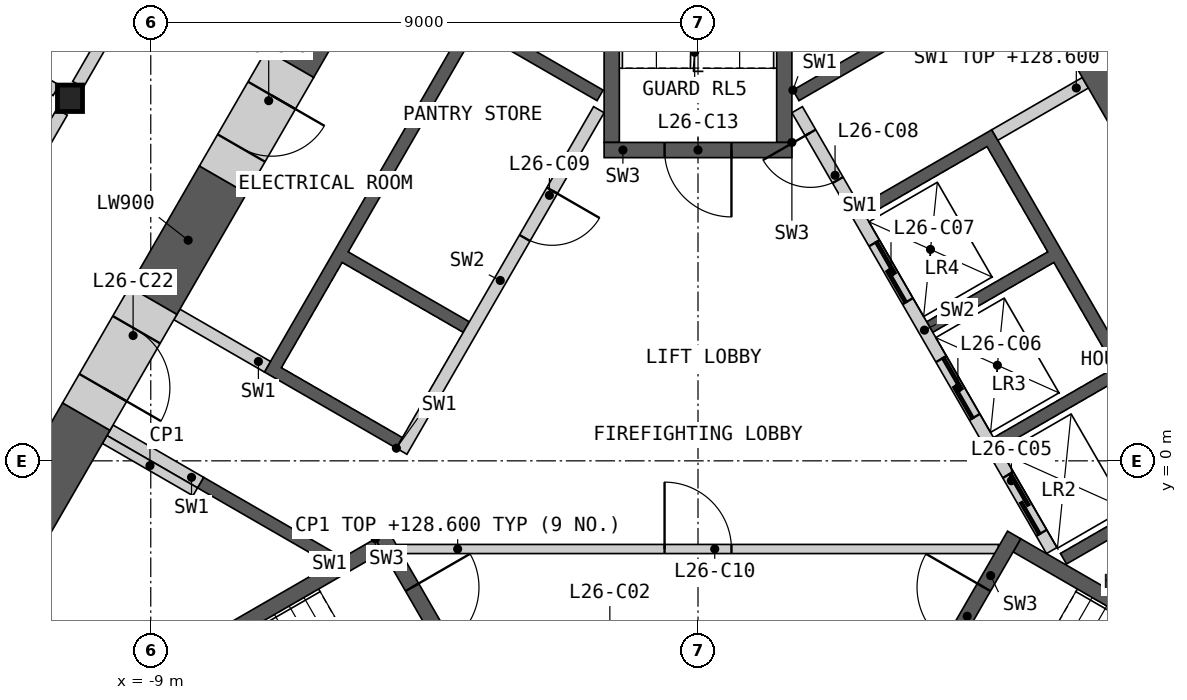
"""IFC4 building model, lengths in metres.
Left out: names, types, materials, properties, quantities, classifications, styles, units other than length and angle.
Written with IfcOpenShell. Run it as: python <this file> out.ifc"""

import sys

from ifc_helpers import new_model, si_unit, direction, frame, frame_2d, origin, origin_2d, place, context, subcontext, project, spatial, polyline, rectangle, i_section, outline, extrude, element, fill, save


model = new_model("IFC4")
c1 = context("Model", 3, precision=1e-05, world=origin(), true_north=direction((0.0, 1.0)))
c2 = subcontext(c1, "Body", "Model", "MODEL_VIEW")
j1 = project(units=[si_unit("LENGTHUNIT", "METRE"), si_unit("PLANEANGLEUNIT", "RADIAN")], contexts=[c1])
p1 = place(None, origin())
s1 = spatial("IfcSite", under=j1, at=p1, CompositionType="ELEMENT")
p2 = place(p1, origin())
s2 = spatial("IfcBuilding", under=s1, at=p2, CompositionType="ELEMENT")
p3 = place(p2, frame((0.0, 0.0, 124.8)))
s3 = spatial("IfcBuildingStorey", under=s2, at=p3, CompositionType="ELEMENT", Elevation=124.8)
p4 = place(p3, frame((-10.328, 5.963, 0.0), z_axis=(0.0, 0.0, 1.0), x_axis=(1.0, 0.0, 0.0)))
e1 = element("IfcColumn", 1, at=p4, inside=s3, PredefinedType="COLUMN", context=c2, shape_type="SweptSolid", body=[
    extrude(i_section(OverallWidth=0.412, OverallDepth=0.435, WebThickness=0.036, FlangeThickness=0.057, at=origin_2d()), origin(), (0.0, 0.0, 1.0), 4.2),
])
p5 = place(p3, origin())
e2 = element("IfcWall", 2, at=p5, inside=s3, PredefinedType="SHEAR", context=c2, shape_type="SweptSolid", body=[
    extrude(outline(polyline([(1.561, 6.097), (3.731, 7.35), (3.831, 7.177), (1.66, 5.924), (1.561, 6.097)])), origin(), (0.0, 0.0, 1.0), 3.8),
])
p6 = place(p3, origin())
e3 = element("IfcWall", 3, at=p6, inside=s3, PredefinedType="SHEAR", context=c2, shape_type="SweptSolid", body=[
    extrude(outline(polyline([(2.66, 4.192), (4.831, 5.445), (8.231, -0.444), (6.061, -1.697), (5.96, -1.524), (7.952, -0.374), (6.952, 1.358), (4.96, 0.208), (4.861, 0.381), (6.852, 1.531), (5.852, 3.263), (3.861, 2.113), (3.76, 2.287), (5.752, 3.437), (4.752, 5.169), (2.76, 4.019), (2.66, 4.192)])), origin(), (0.0, 0.0, 1.0), 3.8),
])
p7 = place(p3, frame((5.817, -1.476, 0.0), z_axis=(0.0, 0.0, 1.0), x_axis=(-0.500002616675, 0.866023893041, 0.0)))
e4 = element("IfcWall", 4, at=p7, inside=s3, PredefinedType="SOLIDWALL", context=c2, shape_type="SweptSolid", body=[
    extrude(rectangle(XDim=8.373, YDim=0.2, at=frame_2d((4.187, 0.0))), origin(), (0.0, 0.0, 1.0), 3.8),
])
p8 = place(p7, frame((0.337, 0.0, 0.0)))
e5 = element("IfcOpeningElement", 5, at=p8, cuts=e4, PredefinedType="OPENING", context=c2, shape_type="SweptSolid", body=[
    extrude(rectangle(XDim=1.1, YDim=2.1, at=frame_2d((0.55, 1.05))), frame((0.0, 0.11, 0.0), z_axis=(0.0, -1.0, 0.0), x_axis=(1.0, 0.0, 0.0)), (0.0, 0.0, 1.0), 0.22),
])
p9 = place(p7, frame((2.537, 0.0, 0.0)))
e6 = element("IfcOpeningElement", 6, at=p9, cuts=e4, PredefinedType="OPENING", context=c2, shape_type="SweptSolid", body=[
    extrude(rectangle(XDim=1.1, YDim=2.1, at=frame_2d((0.55, 1.05))), frame((0.0, 0.11, 0.0), z_axis=(0.0, -1.0, 0.0), x_axis=(1.0, 0.0, 0.0)), (0.0, 0.0, 1.0), 0.22),
])
p10 = place(p7, frame((4.737, 0.0, 0.0)))
e7 = element("IfcOpeningElement", 7, at=p10, cuts=e4, PredefinedType="OPENING", context=c2, shape_type="SweptSolid", body=[
    extrude(rectangle(XDim=1.1, YDim=2.1, at=frame_2d((0.55, 1.05))), frame((0.0, 0.11, 0.0), z_axis=(0.0, -1.0, 0.0), x_axis=(1.0, 0.0, 0.0)), (0.0, 0.0, 1.0), 0.22),
])
p11 = place(p7, frame((7.037, 0.0, 0.0)))
e8 = element("IfcOpeningElement", 8, at=p11, cuts=e4, PredefinedType="OPENING", context=c2, shape_type="SweptSolid", body=[
    extrude(rectangle(XDim=0.9, YDim=2.1, at=frame_2d((0.45, 1.05))), frame((0.0, 0.11, 0.0), z_axis=(0.0, -1.0, 0.0), x_axis=(1.0, 0.0, 0.0)), (0.0, 0.0, 1.0), 0.22),
])
p12 = place(p3, frame((4.881, 5.358, 0.0), z_axis=(0.0, 0.0, 1.0), x_axis=(0.866024871741, 0.500000921525, 0.0)))
e9 = element("IfcWall", 9, at=p12, inside=s3, PredefinedType="SHEAR", context=c2, shape_type="SweptSolid", body=[
    extrude(rectangle(XDim=1.72, YDim=0.2, at=frame_2d((0.86, 0.0))), origin(), (0.0, 0.0, 1.0), 3.8),
])
p13 = place(p3, origin())
e10 = element("IfcWall", 10, at=p13, inside=s3, PredefinedType="SHEAR", context=c2, shape_type="SweptSolid", body=[
    extrude(outline(polyline([(-6.061, -1.697), (-8.231, -0.444), (-8.131, -0.271), (-5.96, -1.524), (-6.061, -1.697)])), origin(), (0.0, 0.0, 1.0), 3.8),
])
p14 = place(p3, origin())
e11 = element("IfcWall", 11, at=p14, inside=s3, PredefinedType="SHEAR", context=c2, shape_type="SweptSolid", body=[
    extrude(outline(polyline([(-4.96, 0.208), (-7.131, 1.461), (-3.731, 7.35), (-1.561, 6.097), (-1.66, 5.924), (-3.652, 7.074), (-5.752, 3.437), (-3.76, 2.287), (-3.861, 2.113), (-5.852, 3.263), (-6.852, 1.531), (-4.861, 0.381), (-4.96, 0.208)])), origin(), (0.0, 0.0, 1.0), 3.8),
])
p15 = place(p3, frame((-1.631, 5.776, 0.0), z_axis=(0.0, 0.0, 1.0), x_axis=(-0.499992876559, -0.866029516466, 0.0)))
e12 = element("IfcWall", 12, at=p15, inside=s3, PredefinedType="SOLIDWALL", context=c2, shape_type="SweptSolid", body=[
    extrude(rectangle(XDim=6.486, YDim=0.2, at=frame_2d((3.243, 0.0))), origin(), (0.0, 0.0, 1.0), 3.8),
])
p16 = place(p15, frame((1.537, 0.0, 0.0)))
e13 = element("IfcOpeningElement", 13, at=p16, cuts=e12, PredefinedType="OPENING", context=c2, shape_type="SweptSolid", body=[
    extrude(rectangle(XDim=0.9, YDim=2.1, at=frame_2d((0.45, 1.05))), frame((0.0, 0.11, 0.0), z_axis=(0.0, -1.0, 0.0), x_axis=(1.0, 0.0, 0.0)), (0.0, 0.0, 1.0), 0.22),
])
for number, where, z_axis, x_axis in (
    (14, (-7.081, 1.548, 0.0), (0.0, 0.0, 1.0), (-0.866, 0.5, 0.0)),
    (15, (-8.181, -0.357, 0.0), (0.0, 0.0, 1.0), (-0.866, 0.5, 0.0)),
):
    element("IfcWall", number, at=place(p3, frame(where, z_axis=z_axis, x_axis=x_axis)), inside=s3, PredefinedType="SHEAR", context=c2, shape_type="SweptSolid", body=[
        extrude(rectangle(XDim=1.72, YDim=0.2, at=frame_2d((0.86, 0.0))), origin(), (0.0, 0.0, 1.0), 3.8),
    ])
p17 = place(p3, frame((-4.941, -1.45, 0.0), z_axis=(0.0, 0.0, 1.0), x_axis=(1.0, 0.0, 0.0)))
e16 = element("IfcWall", 16, at=p17, inside=s3, PredefinedType="PARTITIONING", context=c2, shape_type="SweptSolid", body=[
    extrude(rectangle(XDim=9.882, YDim=0.15, at=frame_2d((4.941, 0.0))), origin(), (0.0, 0.0, 1.0), 3.8),
])
p18 = place(p17, frame((4.391, 0.0, 0.0)))
e17 = element("IfcOpeningElement", 17, at=p18, cuts=e16, PredefinedType="OPENING", context=c2, shape_type="SweptSolid", body=[
    extrude(rectangle(XDim=1.1, YDim=2.1, at=frame_2d((0.55, 1.05))), frame((0.0, 0.085, 0.0), z_axis=(0.0, -1.0, 0.0), x_axis=(1.0, 0.0, 0.0)), (0.0, 0.0, 1.0), 0.17),
])
p19 = place(p3, origin())
e18 = element("IfcWall", 18, at=p19, inside=s3, PredefinedType="SHEAR", context=c2, shape_type="SweptSolid", body=[
    extrude(outline(polyline([(-5.307, -1.281), (-10.374, -4.206), (-10.032, -4.298), (-5.182, -1.498), (-5.307, -1.281)])), origin(), (0.0, 0.0, 1.0), 3.8),
])
p20 = place(p3, frame((-5.199, -1.219, 0.0), z_axis=(0.0, 0.0, 1.0), x_axis=(0.499982516597, -0.866035497597, 0.0)))
e19 = element("IfcWall", 19, at=p20, inside=s3, PredefinedType="SHEAR", context=c2, shape_type="SweptSolid", body=[
    extrude(rectangle(XDim=3.088, YDim=0.25, at=frame_2d((1.544, 0.0))), origin(), (0.0, 0.0, 1.0), 3.8),
])
p21 = place(p20, frame((0.994, 0.0, 0.0)))
e20 = element("IfcOpeningElement", 20, at=p21, cuts=e19, PredefinedType="OPENING", context=c2, shape_type="SweptSolid", body=[
    extrude(rectangle(XDim=1.1, YDim=2.1, at=frame_2d((0.55, 1.05))), frame((0.0, 0.135, 0.0), z_axis=(0.0, -1.0, 0.0), x_axis=(1.0, 0.0, 0.0)), (0.0, 0.0, 1.0), 0.27),
])
p22 = place(p3, origin())
e21 = element("IfcWall", 21, at=p22, inside=s3, PredefinedType="SHEAR", context=c2, shape_type="SweptSolid", body=[
    extrude(outline(polyline([(10.032, -4.298), (10.374, -4.206), (5.307, -1.281), (5.182, -1.498), (10.032, -4.298)])), origin(), (0.0, 0.0, 1.0), 3.8),
])
p23 = place(p3, frame((3.655, -3.893, 0.0), z_axis=(0.0, 0.0, 1.0), x_axis=(0.499982516597, 0.866035497597, 0.0)))
e22 = element("IfcWall", 22, at=p23, inside=s3, PredefinedType="SHEAR", context=c2, shape_type="SweptSolid", body=[
    extrude(rectangle(XDim=3.088, YDim=0.25, at=frame_2d((1.544, 0.0))), origin(), (0.0, 0.0, 1.0), 3.8),
])
p24 = place(p23, frame((0.994, 0.0, 0.0)))
e23 = element("IfcOpeningElement", 23, at=p24, cuts=e22, PredefinedType="OPENING", context=c2, shape_type="SweptSolid", body=[
    extrude(rectangle(XDim=1.1, YDim=2.1, at=frame_2d((0.55, 1.05))), frame((0.0, 0.135, 0.0), z_axis=(0.0, -1.0, 0.0), x_axis=(1.0, 0.0, 0.0)), (0.0, 0.0, 1.0), 0.27),
])
p25 = place(p3, origin())
e24 = element("IfcWall", 24, at=p25, inside=s3, PredefinedType="SHEAR", context=c2, shape_type="SweptSolid", body=[
    extrude(outline(polyline([(1.544, 5.237), (1.544, 11.087), (1.294, 10.837), (1.294, 5.237), (1.544, 5.237)])), origin(), (0.0, 0.0, 1.0), 3.8),
])
p26 = place(p3, origin())
e25 = element("IfcWall", 25, at=p26, inside=s3, PredefinedType="SHEAR", context=c2, shape_type="SweptSolid", body=[
    extrude(outline(polyline([(-1.294, 10.837), (-1.544, 11.087), (-1.544, 5.237), (-1.294, 5.237), (-1.294, 10.837)])), origin(), (0.0, 0.0, 1.0), 3.8),
])
p27 = place(p3, frame((1.544, 5.112, 0.0), z_axis=(0.0, 0.0, 1.0), x_axis=(-1.0, 0.0, 0.0)))
e26 = element("IfcWall", 26, at=p27, inside=s3, PredefinedType="SHEAR", context=c2, shape_type="SweptSolid", body=[
    extrude(rectangle(XDim=3.088, YDim=0.25, at=frame_2d((1.544, 0.0))), origin(), (0.0, 0.0, 1.0), 3.8),
])
p28 = place(p27, frame((0.994, 0.0, 0.0)))
e27 = element("IfcOpeningElement", 27, at=p28, cuts=e26, PredefinedType="OPENING", context=c2, shape_type="SweptSolid", body=[
    extrude(rectangle(XDim=1.1, YDim=2.1, at=frame_2d((0.55, 1.05))), frame((0.0, 0.135, 0.0), z_axis=(0.0, -1.0, 0.0), x_axis=(1.0, 0.0, 0.0)), (0.0, 0.0, 1.0), 0.27),
])
p29 = place(p3, frame((-8.268, -0.509, 0.0), z_axis=(0.0, 0.0, 1.0), x_axis=(-0.866024871741, 0.500000921525, 0.0)))
e28 = element("IfcWall", 28, at=p29, inside=s3, PredefinedType="PARTITIONING", context=c2, shape_type="SweptSolid", body=[
    extrude(rectangle(XDim=1.72, YDim=0.15, at=frame_2d((0.86, 0.0))), origin(), (0.0, 0.0, 1.0), 3.8),
])
p30 = place(p3, frame((7.91, 4.451, 0.0), z_axis=(0.0, 0.0, 1.0), x_axis=(-0.500001962043, 0.866024270995, 0.0)))
e29 = element("IfcWall", 29, at=p30, inside=s3, PredefinedType="SHEAR", context=c2, shape_type="SweptSolid", body=[
    extrude(rectangle(XDim=8.796, YDim=0.9, at=frame_2d((4.398, 0.0))), origin(), (0.0, 0.0, 1.0), 3.8),
])
p31 = place(p3, frame((-10.06, 0.728, 0.0), z_axis=(0.0, 0.0, 1.0), x_axis=(-0.499996331799, -0.866027521611, 0.0)))
e30 = element("IfcWall", 30, at=p31, inside=s3, PredefinedType="SHEAR", context=c2, shape_type="SweptSolid", body=[
    extrude(rectangle(XDim=4.295, YDim=0.9, at=frame_2d((2.148, 0.0))), origin(), (0.0, 0.0, 1.0), 3.8),
])
p32 = place(p3, frame((-5.332, 8.917, 0.0), z_axis=(0.0, 0.0, 1.0), x_axis=(-0.499949934511, -0.866054307178, 0.0)))
e31 = element("IfcWall", 31, at=p32, inside=s3, PredefinedType="SHEAR", context=c2, shape_type="SweptSolid", body=[
    extrude(rectangle(XDim=2.756, YDim=0.9, at=frame_2d((1.378, 0.0))), origin(), (0.0, 0.0, 1.0), 3.8),
])
p33 = place(p3, frame((-7.81, 4.625, 0.0), z_axis=(0.0, 0.0, 1.0), x_axis=(-0.499952165731, -0.866053019151, 0.0)))
e32 = element("IfcWall", 32, at=p33, inside=s3, PredefinedType="SHEAR", context=c2, shape_type="SweptSolid", body=[
    extrude(rectangle(XDim=2.3, YDim=0.9, at=frame_2d((1.15, 0.0))), origin(), (0.0, 0.0, 1.0), 3.8),
])
p34 = place(p3, frame((-6.71, 6.53, 0.0), z_axis=(0.0, 0.0, 1.0), x_axis=(-0.50002983664, -0.866008176907, 0.0)))
e33 = element("IfcWall", 33, at=p34, inside=s3, PredefinedType="SHEAR", context=c2, shape_type="SweptSolid", body=[
    extrude(rectangle(XDim=2.2, YDim=0.9, at=frame_2d((1.1, 0.0))), origin(), (0.0, 0.0, 1.0), 3.8),
])
p35 = place(p34, frame((0.6, 0.0, 0.0)))
e34 = element("IfcOpeningElement", 34, at=p35, cuts=e33, PredefinedType="OPENING", context=c2, shape_type="SweptSolid", body=[
    extrude(rectangle(XDim=1.0, YDim=2.1, at=frame_2d((0.5, 1.05))), frame((0.0, 0.46, 0.0), z_axis=(0.0, -1.0, 0.0), x_axis=(1.0, 0.0, 0.0)), (0.0, 0.0, 1.0), 0.92),
])
p36 = place(p3, frame((-8.96, 2.633, 0.0), z_axis=(0.0, 0.0, 1.0), x_axis=(-0.50002983664, -0.866008176907, 0.0)))
e35 = element("IfcWall", 35, at=p36, inside=s3, PredefinedType="SHEAR", context=c2, shape_type="SweptSolid", body=[
    extrude(rectangle(XDim=2.2, YDim=0.9, at=frame_2d((1.1, 0.0))), origin(), (0.0, 0.0, 1.0), 3.8),
])
p37 = place(p36, frame((0.55, 0.0, 0.0)))
e36 = element("IfcOpeningElement", 36, at=p37, cuts=e35, PredefinedType="OPENING", context=c2, shape_type="SweptSolid", body=[
    extrude(rectangle(XDim=1.1, YDim=2.1, at=frame_2d((0.55, 1.05))), frame((0.0, 0.46, 0.0), z_axis=(0.0, -1.0, 0.0), x_axis=(1.0, 0.0, 0.0)), (0.0, 0.0, 1.0), 0.92),
])
p38 = place(p3, frame((-15.361, -2.754, 0.0), z_axis=(0.0, 0.0, 1.0), x_axis=(0.500004141693, 0.866023012564, 0.0)))
e37 = element("IfcWall", 37, at=p38, inside=s3, PredefinedType="PARTITIONING", context=c2, shape_type="SweptSolid", body=[
    extrude(rectangle(XDim=9.803, YDim=0.2, at=frame_2d((4.902, 0.0))), origin(), (0.0, 0.0, 1.0), 3.8),
])
p39 = place(p38, frame((4.452, 0.0, 0.0)))
e38 = element("IfcOpeningElement", 38, at=p39, cuts=e37, PredefinedType="OPENING", context=c2, shape_type="SweptSolid", body=[
    extrude(rectangle(XDim=1.0, YDim=2.1, at=frame_2d((0.5, 1.05))), frame((0.0, 0.11, 0.0), z_axis=(0.0, -1.0, 0.0), x_axis=(1.0, 0.0, 0.0)), (0.0, 0.0, 1.0), 0.22),
])
p40 = place(p3, frame((5.295, 14.68, 0.0), z_axis=(0.0, 0.0, 1.0), x_axis=(0.500012035596, -0.866018454918, 0.0)))
e39 = element("IfcWall", 39, at=p40, inside=s3, PredefinedType="PARTITIONING", context=c2, shape_type="SweptSolid", body=[
    extrude(rectangle(XDim=9.803, YDim=0.2, at=frame_2d((4.902, 0.0))), origin(), (0.0, 0.0, 1.0), 3.8),
])
p41 = place(p40, frame((4.052, 0.0, 0.0)))
e40 = element("IfcOpeningElement", 40, at=p41, cuts=e39, PredefinedType="OPENING", context=c2, shape_type="SweptSolid", body=[
    extrude(rectangle(XDim=1.8, YDim=2.1, at=frame_2d((0.9, 1.05))), frame((0.0, 0.11, 0.0), z_axis=(0.0, -1.0, 0.0), x_axis=(1.0, 0.0, 0.0)), (0.0, 0.0, 1.0), 0.22),
])
p42 = place(p3, frame((-10.197, 6.19, 0.0), z_axis=(0.0, 0.0, 1.0), x_axis=(0.500012035596, 0.866018454918, 0.0)))
e41 = element("IfcWall", 41, at=p42, inside=s3, PredefinedType="PARTITIONING", context=c2, shape_type="SweptSolid", body=[
    extrude(rectangle(XDim=9.803, YDim=0.2, at=frame_2d((4.902, 0.0))), origin(), (0.0, 0.0, 1.0), 3.8),
])
p43 = place(p42, frame((4.452, 0.0, 0.0)))
e42 = element("IfcOpeningElement", 42, at=p43, cuts=e41, PredefinedType="OPENING", context=c2, shape_type="SweptSolid", body=[
    extrude(rectangle(XDim=1.0, YDim=2.1, at=frame_2d((0.5, 1.05))), frame((0.0, 0.11, 0.0), z_axis=(0.0, -1.0, 0.0), x_axis=(1.0, 0.0, 0.0)), (0.0, 0.0, 1.0), 0.22),
])
p44 = place(p3, frame((-21.536, 12.434, 0.0), z_axis=(0.0, 0.0, 1.0), x_axis=(0.86602461759, -0.500001361726, 0.0)))
e43 = element("IfcWall", 43, at=p44, inside=s3, PredefinedType="PARTITIONING", context=c2, shape_type="SweptSolid", body=[
    extrude(rectangle(XDim=12.679, YDim=0.2, at=frame_2d((6.34, 0.0))), origin(), (0.0, 0.0, 1.0), 2.885),
])
p45 = place(p8, origin())
e44 = element("IfcDoor", 44, at=p45, inside=s3, OperationType="SLIDING_TO_LEFT", PredefinedType="DOOR", context=c2, shape_type="SweptSolid", body=[
    extrude(rectangle(XDim=1.1, YDim=2.1, at=frame_2d((0.55, 1.05))), frame((0.0, 0.025, 0.0), z_axis=(0.0, -1.0, 0.0), x_axis=(1.0, 0.0, 0.0)), (0.0, 0.0, 1.0), 0.05),
])
fill(e5, e44)
p46 = place(p9, origin())
e45 = element("IfcDoor", 45, at=p46, inside=s3, OperationType="SLIDING_TO_LEFT", PredefinedType="DOOR", context=c2, shape_type="SweptSolid", body=[
    extrude(rectangle(XDim=1.1, YDim=2.1, at=frame_2d((0.55, 1.05))), frame((0.0, 0.025, 0.0), z_axis=(0.0, -1.0, 0.0), x_axis=(1.0, 0.0, 0.0)), (0.0, 0.0, 1.0), 0.05),
])
fill(e6, e45)
p47 = place(p10, origin())
e46 = element("IfcDoor", 46, at=p47, inside=s3, OperationType="SLIDING_TO_LEFT", PredefinedType="DOOR", context=c2, shape_type="SweptSolid", body=[
    extrude(rectangle(XDim=1.1, YDim=2.1, at=frame_2d((0.55, 1.05))), frame((0.0, 0.025, 0.0), z_axis=(0.0, -1.0, 0.0), x_axis=(1.0, 0.0, 0.0)), (0.0, 0.0, 1.0), 0.05),
])
fill(e7, e46)
p48 = place(p11, origin())
e47 = element("IfcDoor", 47, at=p48, inside=s3, OperationType="SINGLE_SWING_RIGHT", PredefinedType="DOOR", context=c2, shape_type="SweptSolid", body=[
    extrude(rectangle(XDim=0.9, YDim=2.1, at=frame_2d((0.45, 1.05))), frame((0.0, 0.025, 0.0), z_axis=(0.0, -1.0, 0.0), x_axis=(1.0, 0.0, 0.0)), (0.0, 0.0, 1.0), 0.05),
])
fill(e8, e47)
p49 = place(p16, origin())
e48 = element("IfcDoor", 48, at=p49, inside=s3, OperationType="SINGLE_SWING_LEFT", PredefinedType="DOOR", context=c2, shape_type="SweptSolid", body=[
    extrude(rectangle(XDim=0.9, YDim=2.1, at=frame_2d((0.45, 1.05))), frame((0.0, 0.025, 0.0), z_axis=(0.0, -1.0, 0.0), x_axis=(1.0, 0.0, 0.0)), (0.0, 0.0, 1.0), 0.05),
])
fill(e13, e48)
p50 = place(p18, origin())
e49 = element("IfcDoor", 49, at=p50, inside=s3, OperationType="SINGLE_SWING_LEFT", PredefinedType="DOOR", context=c2, shape_type="SweptSolid", body=[
    extrude(rectangle(XDim=1.1, YDim=2.1, at=frame_2d((0.55, 1.05))), frame((0.0, 0.025, 0.0), z_axis=(0.0, -1.0, 0.0), x_axis=(1.0, 0.0, 0.0)), (0.0, 0.0, 1.0), 0.05),
])
fill(e17, e49)
p51 = place(p21, origin())
e50 = element("IfcDoor", 50, at=p51, inside=s3, OperationType="SINGLE_SWING_LEFT", PredefinedType="DOOR", context=c2, shape_type="SweptSolid", body=[
    extrude(rectangle(XDim=1.1, YDim=2.1, at=frame_2d((0.55, 1.05))), frame((0.0, 0.025, 0.0), z_axis=(0.0, -1.0, 0.0), x_axis=(1.0, 0.0, 0.0)), (0.0, 0.0, 1.0), 0.05),
])
fill(e20, e50)
p52 = place(p24, origin())
e51 = element("IfcDoor", 51, at=p52, inside=s3, OperationType="SINGLE_SWING_RIGHT", PredefinedType="DOOR", context=c2, shape_type="SweptSolid", body=[
    extrude(rectangle(XDim=1.1, YDim=2.1, at=frame_2d((0.55, 1.05))), frame((0.0, 0.025, 0.0), z_axis=(0.0, -1.0, 0.0), x_axis=(1.0, 0.0, 0.0)), (0.0, 0.0, 1.0), 0.05),
])
fill(e23, e51)
p53 = place(p28, origin())
e52 = element("IfcDoor", 52, at=p53, inside=s3, OperationType="SINGLE_SWING_LEFT", PredefinedType="DOOR", context=c2, shape_type="SweptSolid", body=[
    extrude(rectangle(XDim=1.1, YDim=2.1, at=frame_2d((0.55, 1.05))), frame((0.0, 0.025, 0.0), z_axis=(0.0, -1.0, 0.0), x_axis=(1.0, 0.0, 0.0)), (0.0, 0.0, 1.0), 0.05),
])
fill(e27, e52)
p54 = place(p35, origin())
e53 = element("IfcDoor", 53, at=p54, inside=s3, OperationType="SINGLE_SWING_LEFT", PredefinedType="DOOR", context=c2, shape_type="SweptSolid", body=[
    extrude(rectangle(XDim=1.0, YDim=2.1, at=frame_2d((0.5, 1.05))), frame((0.0, 0.205, 0.0), z_axis=(0.0, -1.0, 0.0), x_axis=(1.0, 0.0, 0.0)), (0.0, 0.0, 1.0), 0.05),
])
fill(e34, e53)
p55 = place(p37, origin())
e54 = element("IfcDoor", 54, at=p55, inside=s3, OperationType="SINGLE_SWING_RIGHT", PredefinedType="DOOR", context=c2, shape_type="SweptSolid", body=[
    extrude(rectangle(XDim=1.1, YDim=2.1, at=frame_2d((0.55, 1.05))), frame((0.0, 0.205, 0.0), z_axis=(0.0, -1.0, 0.0), x_axis=(1.0, 0.0, 0.0)), (0.0, 0.0, 1.0), 0.05),
])
fill(e36, e54)
save(model, sys.argv[1])
